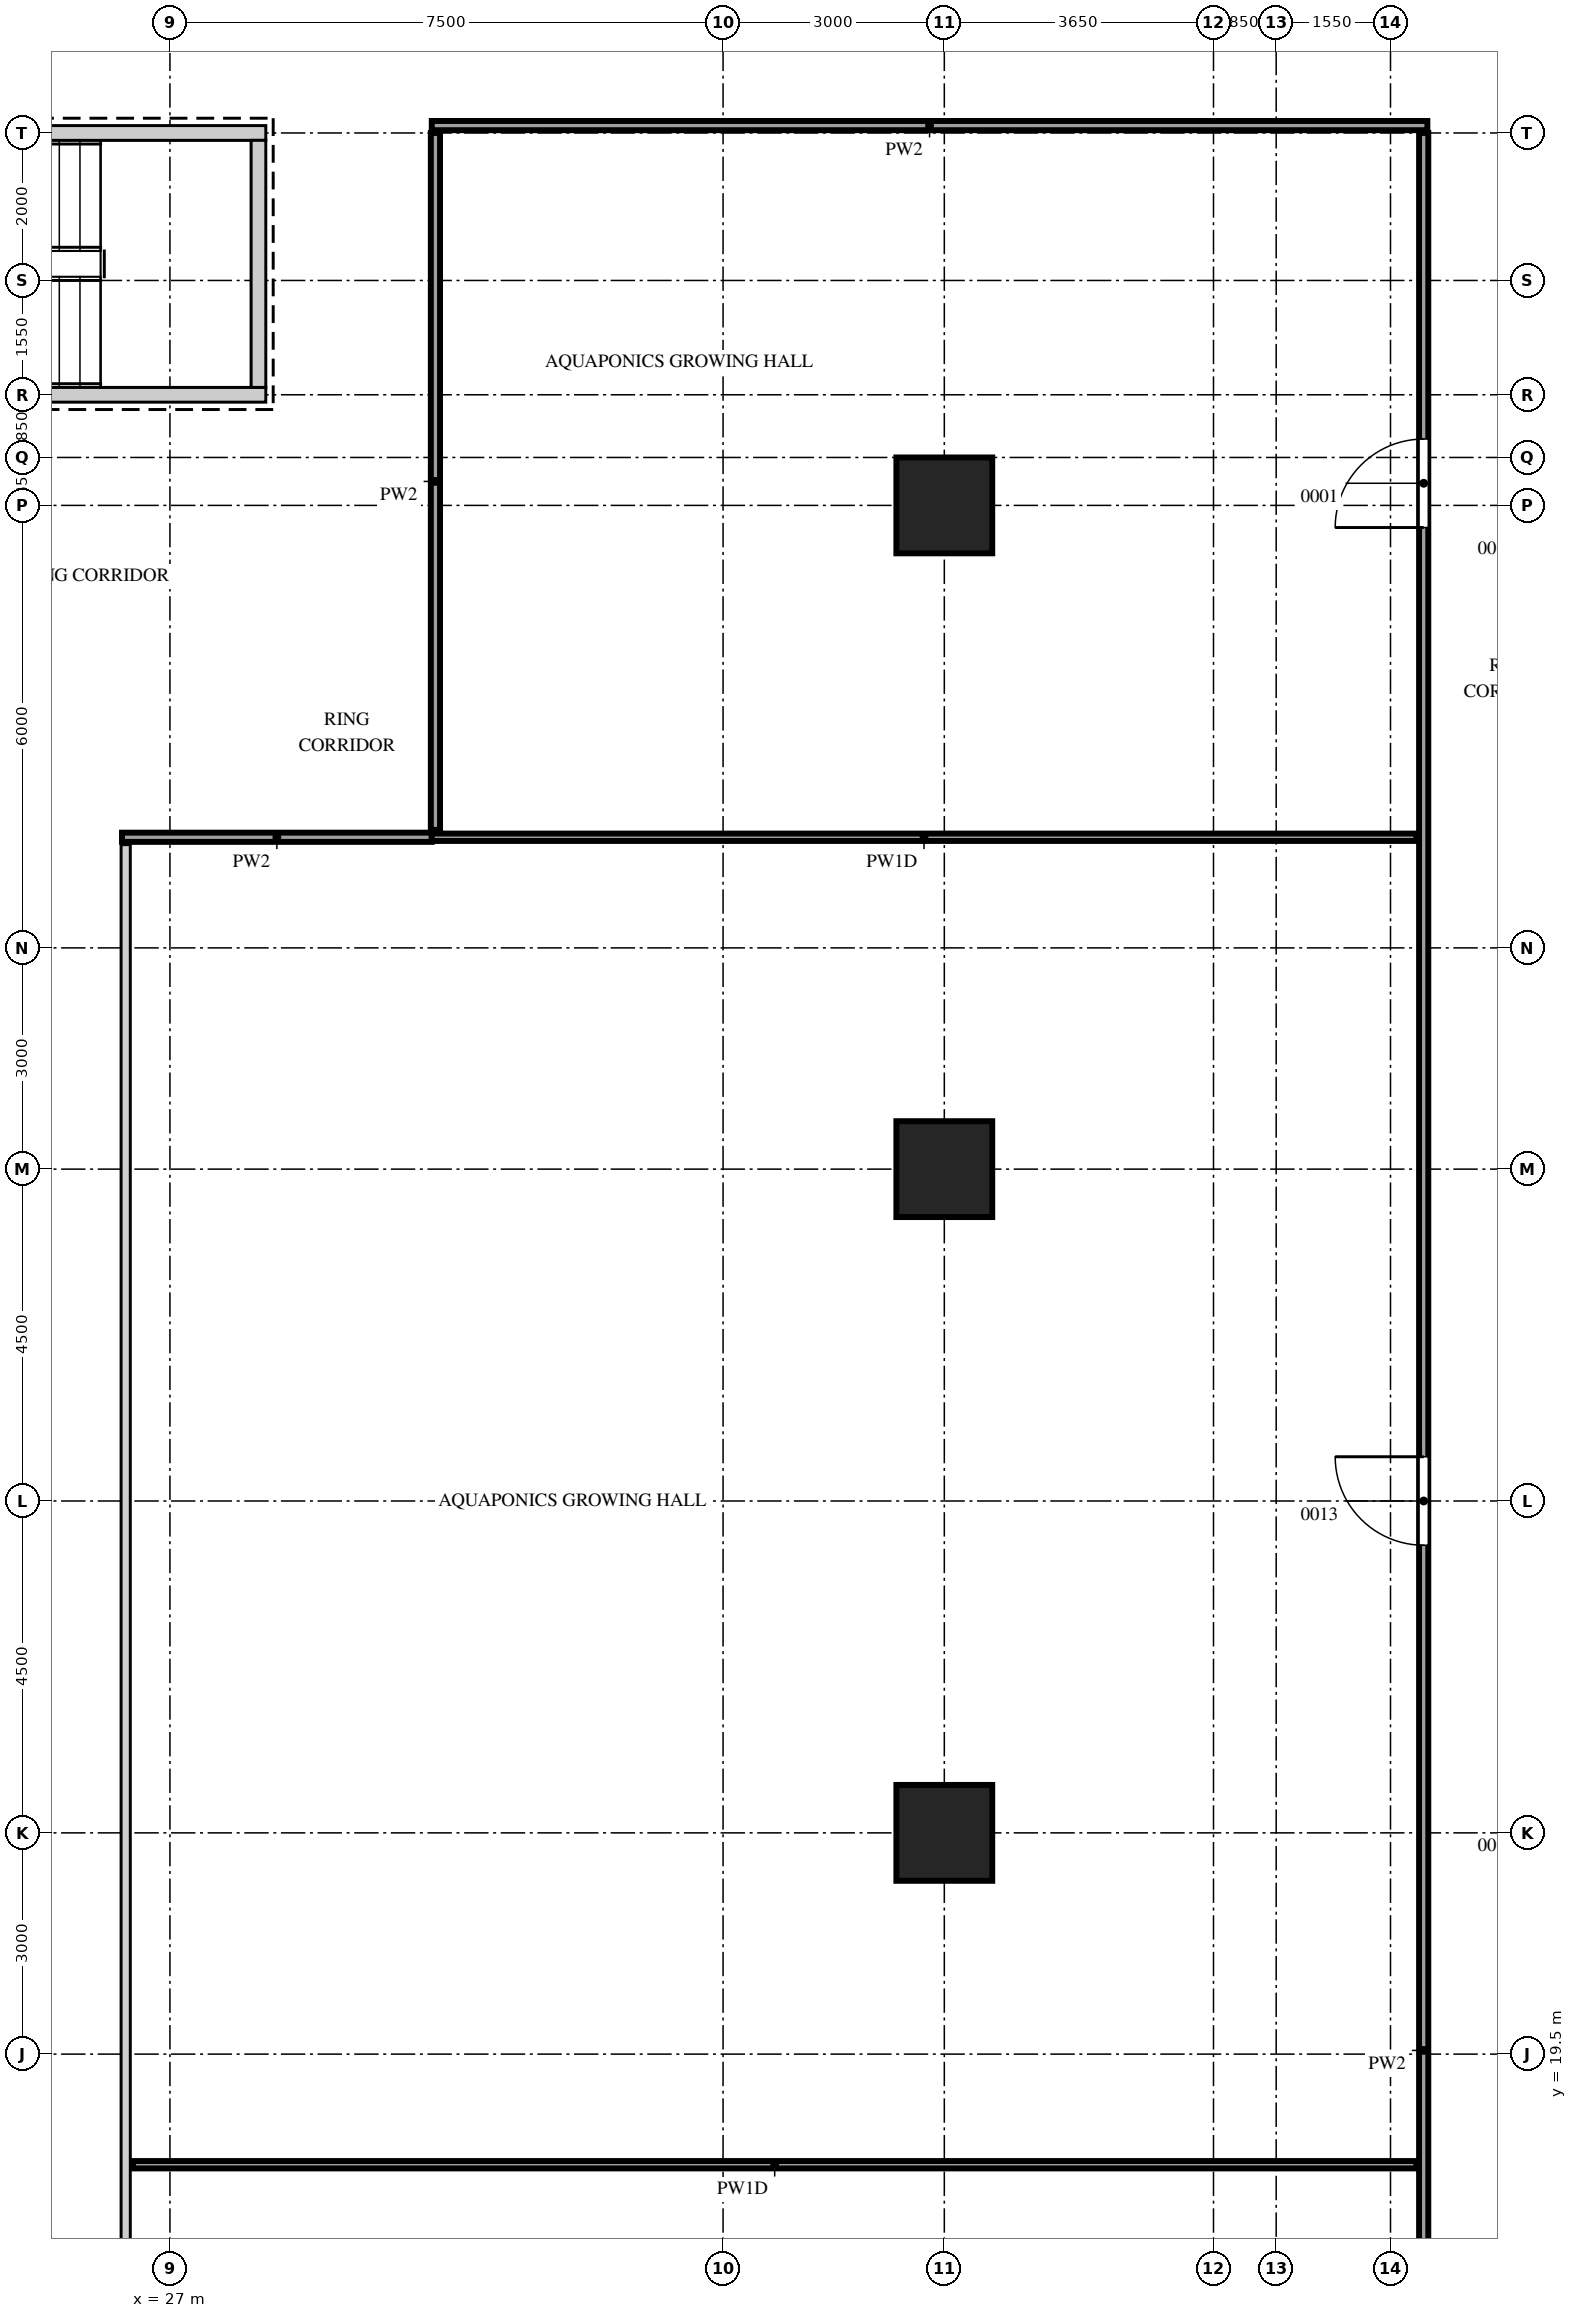
"""IFC4 building model, lengths in metres.
Left out: names, types, materials, properties, quantities, classifications, styles, units other than length and angle.
Written with IfcOpenShell. Run it as: python <this file> out.ifc"""

import sys

from ifc_helpers import new_model, si_unit, direction, frame, frame_2d, origin, origin_2d, place, context, subcontext, project, spatial, rectangle, extrude, source, transform, mapped, element, fill, save


model = new_model("IFC4")
c1 = context("Model", 3, precision=1e-05, world=origin(), true_north=direction((0.0, 1.0)))
c2 = subcontext(c1, "Body", "Model", "MODEL_VIEW")
j1 = project(units=[si_unit("LENGTHUNIT", "METRE"), si_unit("PLANEANGLEUNIT", "RADIAN")], contexts=[c1])
p1 = place(None, origin())
s1 = spatial("IfcSite", under=j1, at=p1, CompositionType="ELEMENT")
p2 = place(p1, origin())
s2 = spatial("IfcBuilding", under=s1, at=p2, CompositionType="ELEMENT")
p3 = place(p2, frame((0.0, 0.0, 145.5)))
s3 = spatial("IfcBuildingStorey", under=s2, at=p3, CompositionType="ELEMENT", Elevation=145.5)
m1 = source(origin(), c2, "Body", "SweptSolid", [
    extrude(rectangle(XDim=7.1, YDim=0.2, at=frame_2d((3.55, 0.0))), origin(), (0.0, 0.0, 1.0), 4.1),
])
p4 = place(p3, frame((21.2, 45.55, 0.0), z_axis=(0.0, 0.0, 1.0), x_axis=(1.0, 0.0, 0.0)))
e1 = element("IfcWall", 1, at=p4, inside=s3, PredefinedType="SHEAR", context=c2, shape_type="MappedRepresentation", body=[
    mapped(m1, transform((0.0, 0.0, 0.0))),
])
m2 = source(origin(), c2, "Body", "SweptSolid", [
    extrude(rectangle(XDim=1.2, YDim=2.1, at=frame_2d((0.6, 1.05))), frame((0.0, 0.11, 0.0), z_axis=(0.0, -1.0, 0.0), x_axis=(1.0, 0.0, 0.0)), (0.0, 0.0, 1.0), 0.22),
])
p5 = place(p4, frame((0.15, 0.0, 0.0)))
e2 = element("IfcOpeningElement", 2, at=p5, cuts=e1, PredefinedType="OPENING", context=c2, shape_type="MappedRepresentation", body=[
    mapped(m2, transform((0.0, 0.0, 0.0))),
])
p6 = place(p3, frame((21.2, 42.0, 0.0), z_axis=(0.0, 0.0, 1.0), x_axis=(1.0, 0.0, 0.0)))
e3 = element("IfcWall", 3, at=p6, inside=s3, PredefinedType="SHEAR", context=c2, shape_type="MappedRepresentation", body=[
    mapped(m1, transform((0.0, 0.0, 0.0))),
])
m3 = source(origin(), c2, "Body", "SweptSolid", [
    extrude(rectangle(XDim=3.35, YDim=0.2, at=frame_2d((1.675, 0.0))), origin(), (0.0, 0.0, 1.0), 4.1),
])
p7 = place(p3, frame((28.2, 42.1, 0.0), z_axis=(0.0, 0.0, 1.0), x_axis=(0.0, 1.0, 0.0)))
e4 = element("IfcWall", 4, at=p7, inside=s3, PredefinedType="SHEAR", context=c2, shape_type="MappedRepresentation", body=[
    mapped(m3, transform((0.0, 0.0, 0.0))),
])
m4 = source(origin(), c2, "Body", "SweptSolid", [
    extrude(rectangle(XDim=1.3, YDim=1.3, at=origin_2d()), origin(), (0.0, 0.0, 1.0), 4.1),
])
for number, where, z_axis, x_axis in (
    (5, (37.5, 22.5, 0.0), (0.0, 0.0, 1.0), (1.0, 0.0, 0.0)),
    (6, (37.5, 31.5, 0.0), (0.0, 0.0, 1.0), (1.0, 0.0, 0.0)),
    (7, (37.5, 40.5, 0.0), (0.0, 0.0, 1.0), (1.0, 0.0, 0.0)),
):
    element("IfcColumn", number, at=place(p3, frame(where, z_axis=z_axis, x_axis=x_axis)), inside=s3, PredefinedType="COLUMN", context=c2, shape_type="MappedRepresentation", body=[
        mapped(m4, transform((0.0, 0.0, 0.0))),
    ])
m5 = source(origin(), c2, "Body", "SweptSolid", [
    extrude(rectangle(XDim=23.2, YDim=0.125, at=frame_2d((11.6, 0.0))), origin(), (0.0, 0.0, 1.0), 4.2),
])
p8 = place(p3, frame((26.4, 12.7, 0.0), z_axis=(0.0, 0.0, 1.0), x_axis=(0.0, 1.0, 0.0)))
e8 = element("IfcWall", 8, at=p8, inside=s3, PredefinedType="PARTITIONING", context=c2, shape_type="MappedRepresentation", body=[
    mapped(m5, transform((0.0, 0.0, 0.0))),
])
m6 = source(origin(), c2, "Body", "SweptSolid", [
    extrude(rectangle(XDim=0.9, YDim=2.1, at=frame_2d((0.45, 1.05))), frame((0.0, 0.073, 0.0), z_axis=(0.0, -1.0, 0.0), x_axis=(1.0, 0.0, 0.0)), (0.0, 0.0, 1.0), 0.145),
])
p9 = place(p8, frame((2.15, 0.0, 0.0)))
e9 = element("IfcOpeningElement", 9, at=p9, cuts=e8, PredefinedType="OPENING", context=c2, shape_type="MappedRepresentation", body=[
    mapped(m6, transform((0.0, 0.0, 0.0))),
])
m7 = source(origin(), c2, "Body", "SweptSolid", [
    extrude(rectangle(XDim=32.85, YDim=0.125, at=frame_2d((16.425, 0.0))), origin(), (0.0, 0.0, 1.0), 4.2),
])
p10 = place(p3, frame((44.0, 12.7, 0.0), z_axis=(0.0, 0.0, 1.0), x_axis=(0.0, 1.0, 0.0)))
e10 = element("IfcWall", 10, at=p10, inside=s3, PredefinedType="PARTITIONING", context=c2, shape_type="MappedRepresentation", body=[
    mapped(m7, transform((0.0, 0.0, 0.0))),
])
m8 = source(origin(), c2, "Body", "SweptSolid", [
    extrude(rectangle(XDim=1.2, YDim=2.1, at=frame_2d((0.6, 1.05))), frame((0.0, 0.073, 0.0), z_axis=(0.0, -1.0, 0.0), x_axis=(1.0, 0.0, 0.0)), (0.0, 0.0, 1.0), 0.145),
])
p11 = place(p10, frame((13.7, 0.0, 0.0)))
e11 = element("IfcOpeningElement", 11, at=p11, cuts=e10, PredefinedType="OPENING", context=c2, shape_type="MappedRepresentation", body=[
    mapped(m8, transform((0.0, 0.0, 0.0))),
])
p12 = place(p10, frame((27.5, 0.0, 0.0)))
e12 = element("IfcOpeningElement", 12, at=p12, cuts=e10, PredefinedType="OPENING", context=c2, shape_type="MappedRepresentation", body=[
    mapped(m8, transform((0.0, 0.0, 0.0))),
])
m9 = source(origin(), c2, "Body", "SweptSolid", [
    extrude(rectangle(XDim=17.4, YDim=0.1, at=frame_2d((8.7, 0.0))), origin(), (0.0, 0.0, 1.0), 4.2),
])
p13 = place(p3, frame((26.5, 18.0, 0.0), z_axis=(0.0, 0.0, 1.0), x_axis=(1.0, 0.0, 0.0)))
e13 = element("IfcWall", 13, at=p13, inside=s3, PredefinedType="PARTITIONING", context=c2, shape_type="MappedRepresentation", body=[
    mapped(m9, transform((0.0, 0.0, 0.0))),
])
m10 = source(origin(), c2, "Body", "SweptSolid", [
    extrude(rectangle(XDim=4.2, YDim=0.125, at=frame_2d((2.1, 0.0))), origin(), (0.0, 0.0, 1.0), 4.2),
])
p14 = place(p3, frame((26.35, 36.0, 0.0), z_axis=(0.0, 0.0, 1.0), x_axis=(1.0, 0.0, 0.0)))
e14 = element("IfcWall", 14, at=p14, inside=s3, PredefinedType="PARTITIONING", context=c2, shape_type="MappedRepresentation", body=[
    mapped(m10, transform((0.0, 0.0, 0.0))),
])
m11 = source(origin(), c2, "Body", "SweptSolid", [
    extrude(rectangle(XDim=13.35, YDim=0.1, at=frame_2d((6.675, 0.0))), origin(), (0.0, 0.0, 1.0), 4.2),
])
p15 = place(p3, frame((30.55, 36.0, 0.0), z_axis=(0.0, 0.0, 1.0), x_axis=(1.0, 0.0, 0.0)))
e15 = element("IfcWall", 15, at=p15, inside=s3, PredefinedType="PARTITIONING", context=c2, shape_type="MappedRepresentation", body=[
    mapped(m11, transform((0.0, 0.0, 0.0))),
])
m12 = source(origin(), c2, "Body", "SweptSolid", [
    extrude(rectangle(XDim=9.45, YDim=0.125, at=frame_2d((4.725, 0.0))), origin(), (0.0, 0.0, 1.0), 4.2),
])
p16 = place(p3, frame((30.6, 36.1, 0.0), z_axis=(0.0, 0.0, 1.0), x_axis=(0.0, 1.0, 0.0)))
e16 = element("IfcWall", 16, at=p16, inside=s3, PredefinedType="PARTITIONING", context=c2, shape_type="MappedRepresentation", body=[
    mapped(m12, transform((0.0, 0.0, 0.0))),
])
m13 = source(origin(), c2, "Body", "SweptSolid", [
    extrude(rectangle(XDim=13.5, YDim=0.125, at=frame_2d((6.75, 0.0))), origin(), (0.0, 0.0, 1.0), 4.2),
])
p17 = place(p3, frame((30.55, 45.65, 0.0), z_axis=(0.0, 0.0, 1.0), x_axis=(1.0, 0.0, 0.0)))
e17 = element("IfcWall", 17, at=p17, inside=s3, PredefinedType="PARTITIONING", context=c2, shape_type="MappedRepresentation", body=[
    mapped(m13, transform((0.0, 0.0, 0.0))),
])
m14 = source(origin(), c2, "Body", "SweptSolid", [
    extrude(rectangle(XDim=1.2, YDim=2.1, at=frame_2d((0.6, 1.05))), frame((0.0, 0.025, 0.0), z_axis=(0.0, -1.0, 0.0), x_axis=(1.0, 0.0, 0.0)), (0.0, 0.0, 1.0), 0.05),
])
p18 = place(p11, origin())
e18 = element("IfcDoor", 18, at=p18, inside=s3, OperationType="SINGLE_SWING_LEFT", PredefinedType="DOOR", context=c2, shape_type="MappedRepresentation", body=[
    mapped(m14, transform((0.0, 0.0, 0.0))),
])
fill(e11, e18)
p19 = place(p12, origin())
e19 = element("IfcDoor", 19, at=p19, inside=s3, OperationType="SINGLE_SWING_RIGHT", PredefinedType="DOOR", context=c2, shape_type="MappedRepresentation", body=[
    mapped(m14, transform((0.0, 0.0, 0.0))),
])
fill(e12, e19)
save(model, sys.argv[1])
